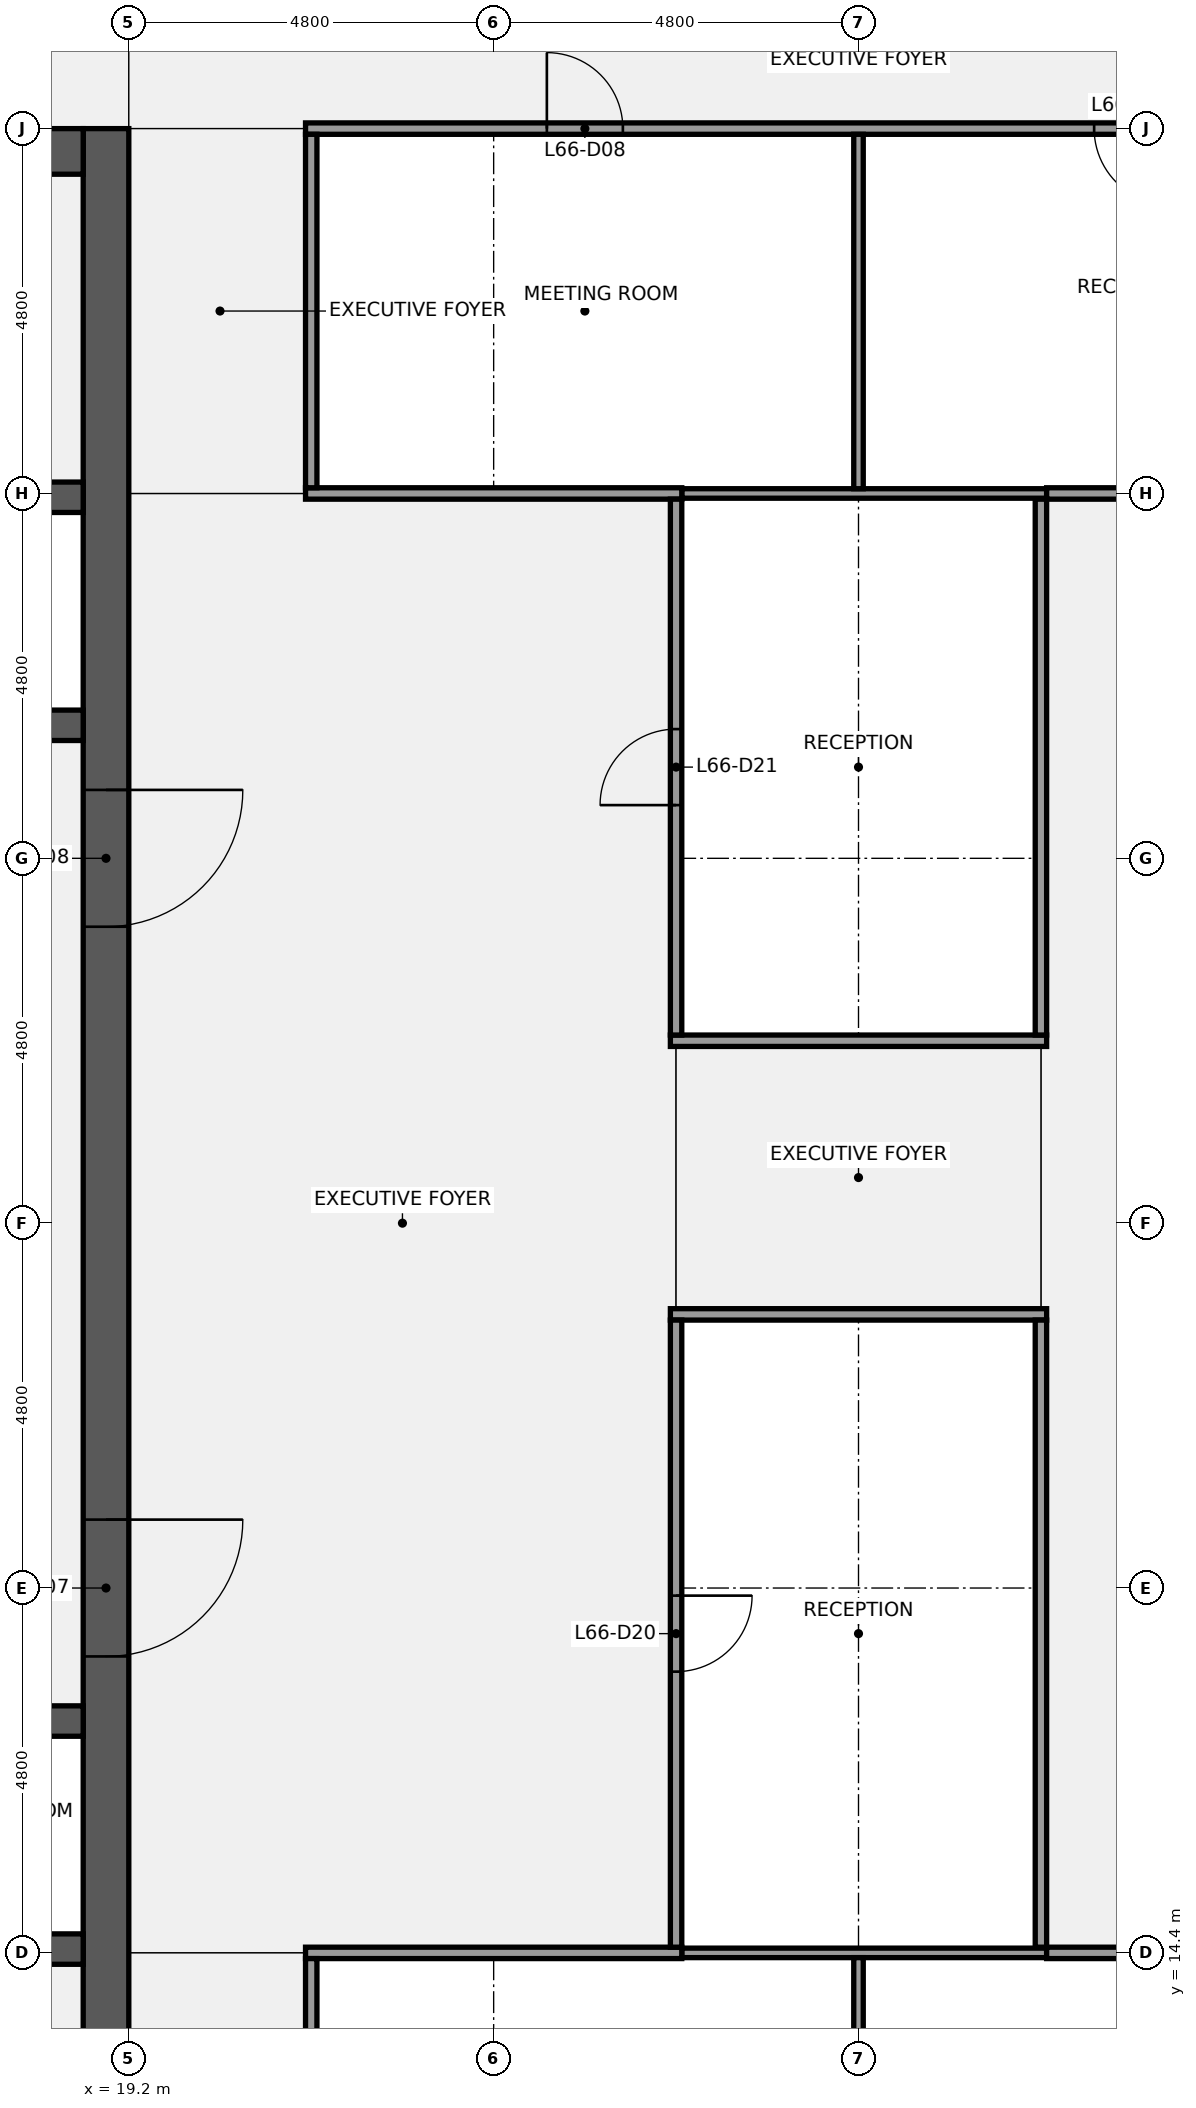
"""IFC4 building model, lengths in metres.
Left out: names, types, materials, properties, quantities, classifications, styles, units other than length and angle.
Written with IfcOpenShell. Run it as: python <this file> out.ifc"""

import sys

from ifc_helpers import new_model, si_unit, direction, frame, frame_2d, origin, place, context, subcontext, project, spatial, rectangle, extrude, element, fill, save


model = new_model("IFC4")
c1 = context("Model", 3, precision=1e-05, world=origin(), true_north=direction((0.0, 1.0)))
c2 = subcontext(c1, "Body", "Model", "MODEL_VIEW")
j1 = project(units=[si_unit("LENGTHUNIT", "METRE"), si_unit("PLANEANGLEUNIT", "RADIAN")], contexts=[c1])
p1 = place(None, origin())
s1 = spatial("IfcSite", under=j1, at=p1, CompositionType="ELEMENT")
p2 = place(p1, origin())
s2 = spatial("IfcBuilding", under=s1, at=p2, CompositionType="ELEMENT")
p3 = place(p2, frame((0.0, 0.0, 302.3)))
s3 = spatial("IfcBuildingStorey", under=s2, at=p3, CompositionType="ELEMENT", Elevation=302.3)
p4 = place(p3, frame((18.9, 38.4, 0.0), z_axis=(0.0, 0.0, 1.0), x_axis=(0.0, -1.0, 0.0)))
e1 = element("IfcWall", 1, at=p4, inside=s3, PredefinedType="SHEAR", context=c2, shape_type="SweptSolid", body=[
    extrude(rectangle(XDim=28.8, YDim=0.6, at=frame_2d((14.4, 0.0))), origin(), (0.0, 0.0, 1.0), 3.84),
])
p5 = place(p4, frame((18.3, 0.0, 0.0)))
e2 = element("IfcOpeningElement", 2, at=p5, cuts=e1, PredefinedType="OPENING", context=c2, shape_type="SweptSolid", body=[
    extrude(rectangle(XDim=1.8, YDim=2.1, at=frame_2d((0.9, 1.05))), frame((0.0, 0.31, 0.0), z_axis=(0.0, -1.0, 0.0), x_axis=(1.0, 0.0, 0.0)), (0.0, 0.0, 1.0), 0.62),
])
p6 = place(p4, frame((8.7, 0.0, 0.0)))
e3 = element("IfcOpeningElement", 3, at=p6, cuts=e1, PredefinedType="OPENING", context=c2, shape_type="SweptSolid", body=[
    extrude(rectangle(XDim=1.8, YDim=2.1, at=frame_2d((0.9, 1.05))), frame((0.0, 0.31, 0.0), z_axis=(0.0, -1.0, 0.0), x_axis=(1.0, 0.0, 0.0)), (0.0, 0.0, 1.0), 0.62),
])
p7 = place(p3, frame((0.6, 14.45, 0.0), z_axis=(0.0, 0.0, 1.0), x_axis=(1.0, 0.0, 0.0)))
e4 = element("IfcWall", 4, at=p7, inside=s3, PredefinedType="SHEAR", context=c2, shape_type="SweptSolid", body=[
    extrude(rectangle(XDim=18.0, YDim=0.4, at=frame_2d((9.0, 0.0))), origin(), (0.0, 0.0, 1.0), 3.84),
])
p8 = place(p3, frame((0.6, 17.45, 0.0), z_axis=(0.0, 0.0, 1.0), x_axis=(1.0, 0.0, 0.0)))
e5 = element("IfcWall", 5, at=p8, inside=s3, PredefinedType="SHEAR", context=c2, shape_type="SweptSolid", body=[
    extrude(rectangle(XDim=18.0, YDim=0.4, at=frame_2d((9.0, 0.0))), origin(), (0.0, 0.0, 1.0), 3.84),
])
p9 = place(p8, frame((2.163, 0.0, 0.0)))
e6 = element("IfcOpeningElement", 6, at=p9, cuts=e5, PredefinedType="OPENING", context=c2, shape_type="SweptSolid", body=[
    extrude(rectangle(XDim=1.0, YDim=2.1, at=frame_2d((0.5, 1.05))), frame((0.0, 0.21, 0.0), z_axis=(0.0, -1.0, 0.0), x_axis=(1.0, 0.0, 0.0)), (0.0, 0.0, 1.0), 0.42),
])
p10 = place(p8, frame((7.0, 0.0, 0.0)))
e7 = element("IfcOpeningElement", 7, at=p10, cuts=e5, PredefinedType="OPENING", context=c2, shape_type="SweptSolid", body=[
    extrude(rectangle(XDim=1.0, YDim=2.1, at=frame_2d((0.5, 1.05))), frame((0.0, 0.21, 0.0), z_axis=(0.0, -1.0, 0.0), x_axis=(1.0, 0.0, 0.0)), (0.0, 0.0, 1.0), 0.42),
])
p11 = place(p8, frame((11.5, 0.0, 0.0)))
e8 = element("IfcOpeningElement", 8, at=p11, cuts=e5, PredefinedType="OPENING", context=c2, shape_type="SweptSolid", body=[
    extrude(rectangle(XDim=1.0, YDim=2.1, at=frame_2d((0.5, 1.05))), frame((0.0, 0.21, 0.0), z_axis=(0.0, -1.0, 0.0), x_axis=(1.0, 0.0, 0.0)), (0.0, 0.0, 1.0), 0.42),
])
p12 = place(p8, frame((15.738, 0.0, 0.0)))
e9 = element("IfcOpeningElement", 9, at=p12, cuts=e5, PredefinedType="OPENING", context=c2, shape_type="SweptSolid", body=[
    extrude(rectangle(XDim=1.0, YDim=2.1, at=frame_2d((0.5, 1.05))), frame((0.0, 0.21, 0.0), z_axis=(0.0, -1.0, 0.0), x_axis=(1.0, 0.0, 0.0)), (0.0, 0.0, 1.0), 0.42),
])
p13 = place(p3, frame((0.6, 30.55, 0.0), z_axis=(0.0, 0.0, 1.0), x_axis=(1.0, 0.0, 0.0)))
e10 = element("IfcWall", 10, at=p13, inside=s3, PredefinedType="SHEAR", context=c2, shape_type="SweptSolid", body=[
    extrude(rectangle(XDim=18.0, YDim=0.4, at=frame_2d((9.0, 0.0))), origin(), (0.0, 0.0, 1.0), 3.84),
])
p14 = place(p13, frame((1.6, 0.0, 0.0)))
e11 = element("IfcOpeningElement", 11, at=p14, cuts=e10, PredefinedType="OPENING", context=c2, shape_type="SweptSolid", body=[
    extrude(rectangle(XDim=1.2, YDim=2.1, at=frame_2d((0.6, 1.05))), frame((0.0, 0.21, 0.0), z_axis=(0.0, -1.0, 0.0), x_axis=(1.0, 0.0, 0.0)), (0.0, 0.0, 1.0), 0.42),
])
p15 = place(p13, frame((4.2, 0.0, 0.0)))
e12 = element("IfcOpeningElement", 12, at=p15, cuts=e10, PredefinedType="OPENING", context=c2, shape_type="SweptSolid", body=[
    extrude(rectangle(XDim=1.2, YDim=2.1, at=frame_2d((0.6, 1.05))), frame((0.0, 0.21, 0.0), z_axis=(0.0, -1.0, 0.0), x_axis=(1.0, 0.0, 0.0)), (0.0, 0.0, 1.0), 0.42),
])
p16 = place(p13, frame((6.8, 0.0, 0.0)))
e13 = element("IfcOpeningElement", 13, at=p16, cuts=e10, PredefinedType="OPENING", context=c2, shape_type="SweptSolid", body=[
    extrude(rectangle(XDim=1.2, YDim=2.1, at=frame_2d((0.6, 1.05))), frame((0.0, 0.21, 0.0), z_axis=(0.0, -1.0, 0.0), x_axis=(1.0, 0.0, 0.0)), (0.0, 0.0, 1.0), 0.42),
])
p17 = place(p13, frame((10.0, 0.0, 0.0)))
e14 = element("IfcOpeningElement", 14, at=p17, cuts=e10, PredefinedType="OPENING", context=c2, shape_type="SweptSolid", body=[
    extrude(rectangle(XDim=1.2, YDim=2.1, at=frame_2d((0.6, 1.05))), frame((0.0, 0.21, 0.0), z_axis=(0.0, -1.0, 0.0), x_axis=(1.0, 0.0, 0.0)), (0.0, 0.0, 1.0), 0.42),
])
p18 = place(p13, frame((12.6, 0.0, 0.0)))
e15 = element("IfcOpeningElement", 15, at=p18, cuts=e10, PredefinedType="OPENING", context=c2, shape_type="SweptSolid", body=[
    extrude(rectangle(XDim=1.2, YDim=2.1, at=frame_2d((0.6, 1.05))), frame((0.0, 0.21, 0.0), z_axis=(0.0, -1.0, 0.0), x_axis=(1.0, 0.0, 0.0)), (0.0, 0.0, 1.0), 0.42),
])
p19 = place(p13, frame((15.2, 0.0, 0.0)))
e16 = element("IfcOpeningElement", 16, at=p19, cuts=e10, PredefinedType="OPENING", context=c2, shape_type="SweptSolid", body=[
    extrude(rectangle(XDim=1.2, YDim=2.1, at=frame_2d((0.6, 1.05))), frame((0.0, 0.21, 0.0), z_axis=(0.0, -1.0, 0.0), x_axis=(1.0, 0.0, 0.0)), (0.0, 0.0, 1.0), 0.42),
])
p20 = place(p3, frame((0.6, 33.55, 0.0), z_axis=(0.0, 0.0, 1.0), x_axis=(1.0, 0.0, 0.0)))
e17 = element("IfcWall", 17, at=p20, inside=s3, PredefinedType="SHEAR", context=c2, shape_type="SweptSolid", body=[
    extrude(rectangle(XDim=18.0, YDim=0.4, at=frame_2d((9.0, 0.0))), origin(), (0.0, 0.0, 1.0), 3.84),
])
p21 = place(p3, frame((14.4, 38.1, 0.0), z_axis=(0.0, 0.0, 1.0), x_axis=(1.0, 0.0, 0.0)))
e18 = element("IfcWall", 18, at=p21, inside=s3, PredefinedType="SHEAR", context=c2, shape_type="SweptSolid", body=[
    extrude(rectangle(XDim=4.2, YDim=0.6, at=frame_2d((2.1, 0.0))), origin(), (0.0, 0.0, 1.0), 3.84),
])
p22 = place(p21, frame((1.85, 0.0, 0.0)))
e19 = element("IfcOpeningElement", 19, at=p22, cuts=e18, PredefinedType="OPENING", context=c2, shape_type="SweptSolid", body=[
    extrude(rectangle(XDim=1.1, YDim=2.1, at=frame_2d((0.55, 1.05))), frame((0.0, 0.31, 0.0), z_axis=(0.0, -1.0, 0.0), x_axis=(1.0, 0.0, 0.0)), (0.0, 0.0, 1.0), 0.62),
])
p23 = place(p3, frame((26.475, 14.4, 0.0), z_axis=(0.0, 0.0, 1.0), x_axis=(1.0, 0.0, 0.0)))
e20 = element("IfcWall", 20, at=p23, inside=s3, PredefinedType="PARTITIONING", context=c2, shape_type="SweptSolid", body=[
    extrude(rectangle(XDim=4.8, YDim=0.125, at=frame_2d((2.4, 0.0))), origin(), (0.0, 0.0, 1.0), 2.87),
])
p24 = place(p3, frame((21.525, 14.4, 0.0), z_axis=(0.0, 0.0, 1.0), x_axis=(1.0, 0.0, 0.0)))
e21 = element("IfcWall", 21, at=p24, inside=s3, PredefinedType="PARTITIONING", context=c2, shape_type="SweptSolid", body=[
    extrude(rectangle(XDim=4.95, YDim=0.15, at=frame_2d((2.475, 0.0))), origin(), (0.0, 0.0, 1.0), 2.87),
])
p25 = place(p3, frame((31.275, 14.4, 0.0), z_axis=(0.0, 0.0, 1.0), x_axis=(1.0, 0.0, 0.0)))
e22 = element("IfcWall", 22, at=p25, inside=s3, PredefinedType="PARTITIONING", context=c2, shape_type="SweptSolid", body=[
    extrude(rectangle(XDim=4.8, YDim=0.15, at=frame_2d((2.4, 0.0))), origin(), (0.0, 0.0, 1.0), 2.87),
])
for number, where, z_axis, x_axis in (
    (23, (26.325, 22.8, 0.0), (0.0, 0.0, 1.0), (1.0, 0.0, 0.0)),
    (24, (26.325, 26.4, 0.0), (0.0, 0.0, 1.0), (1.0, 0.0, 0.0)),
):
    element("IfcWall", number, at=place(p3, frame(where, z_axis=z_axis, x_axis=x_axis)), inside=s3, PredefinedType="PARTITIONING", context=c2, shape_type="SweptSolid", body=[
        extrude(rectangle(XDim=4.95, YDim=0.15, at=frame_2d((2.475, 0.0))), origin(), (0.0, 0.0, 1.0), 2.87),
    ])
p26 = place(p3, frame((26.475, 33.6, 0.0), z_axis=(0.0, 0.0, 1.0), x_axis=(1.0, 0.0, 0.0)))
e25 = element("IfcWall", 25, at=p26, inside=s3, PredefinedType="PARTITIONING", context=c2, shape_type="SweptSolid", body=[
    extrude(rectangle(XDim=4.8, YDim=0.125, at=frame_2d((2.4, 0.0))), origin(), (0.0, 0.0, 1.0), 2.87),
])
p27 = place(p3, frame((21.525, 33.6, 0.0), z_axis=(0.0, 0.0, 1.0), x_axis=(1.0, 0.0, 0.0)))
e26 = element("IfcWall", 26, at=p27, inside=s3, PredefinedType="PARTITIONING", context=c2, shape_type="SweptSolid", body=[
    extrude(rectangle(XDim=4.95, YDim=0.15, at=frame_2d((2.475, 0.0))), origin(), (0.0, 0.0, 1.0), 2.87),
])
p28 = place(p3, frame((31.275, 33.6, 0.0), z_axis=(0.0, 0.0, 1.0), x_axis=(1.0, 0.0, 0.0)))
e27 = element("IfcWall", 27, at=p28, inside=s3, PredefinedType="PARTITIONING", context=c2, shape_type="SweptSolid", body=[
    extrude(rectangle(XDim=4.8, YDim=0.15, at=frame_2d((2.4, 0.0))), origin(), (0.0, 0.0, 1.0), 2.87),
])
p29 = place(p3, frame((21.525, 38.4, 0.0), z_axis=(0.0, 0.0, 1.0), x_axis=(1.0, 0.0, 0.0)))
e28 = element("IfcWall", 28, at=p29, inside=s3, PredefinedType="PARTITIONING", context=c2, shape_type="SweptSolid", body=[
    extrude(rectangle(XDim=14.55, YDim=0.15, at=frame_2d((7.275, 0.0))), origin(), (0.0, 0.0, 1.0), 2.87),
])
p30 = place(p29, frame((3.175, 0.0, 0.0)))
e29 = element("IfcOpeningElement", 29, at=p30, cuts=e28, PredefinedType="OPENING", context=c2, shape_type="SweptSolid", body=[
    extrude(rectangle(XDim=1.0, YDim=2.1, at=frame_2d((0.5, 1.05))), frame((0.0, 0.085, 0.0), z_axis=(0.0, -1.0, 0.0), x_axis=(1.0, 0.0, 0.0)), (0.0, 0.0, 1.0), 0.17),
])
p31 = place(p29, frame((10.375, 0.0, 0.0)))
e30 = element("IfcOpeningElement", 30, at=p31, cuts=e28, PredefinedType="OPENING", context=c2, shape_type="SweptSolid", body=[
    extrude(rectangle(XDim=1.0, YDim=2.1, at=frame_2d((0.5, 1.05))), frame((0.0, 0.085, 0.0), z_axis=(0.0, -1.0, 0.0), x_axis=(1.0, 0.0, 0.0)), (0.0, 0.0, 1.0), 0.17),
])
for number, where, z_axis, x_axis in (
    (31, (21.6, 9.675, 0.0), (0.0, 0.0, 1.0), (0.0, 1.0, 0.0)),
    (32, (21.6, 33.675, 0.0), (0.0, 0.0, 1.0), (0.0, 1.0, 0.0)),
):
    element("IfcWall", number, at=place(p3, frame(where, z_axis=z_axis, x_axis=x_axis)), inside=s3, PredefinedType="PARTITIONING", context=c2, shape_type="SweptSolid", body=[
        extrude(rectangle(XDim=4.65, YDim=0.15, at=frame_2d((2.325, 0.0))), origin(), (0.0, 0.0, 1.0), 2.87),
    ])
p32 = place(p3, frame((26.4, 14.475, 0.0), z_axis=(0.0, 0.0, 1.0), x_axis=(0.0, 1.0, 0.0)))
e33 = element("IfcWall", 33, at=p32, inside=s3, PredefinedType="PARTITIONING", context=c2, shape_type="SweptSolid", body=[
    extrude(rectangle(XDim=8.25, YDim=0.15, at=frame_2d((4.125, 0.0))), origin(), (0.0, 0.0, 1.0), 2.87),
])
p33 = place(p32, frame((3.625, 0.0, 0.0)))
e34 = element("IfcOpeningElement", 34, at=p33, cuts=e33, PredefinedType="OPENING", context=c2, shape_type="SweptSolid", body=[
    extrude(rectangle(XDim=1.0, YDim=2.1, at=frame_2d((0.5, 1.05))), frame((0.0, 0.085, 0.0), z_axis=(0.0, -1.0, 0.0), x_axis=(1.0, 0.0, 0.0)), (0.0, 0.0, 1.0), 0.17),
])
p34 = place(p3, frame((26.4, 26.475, 0.0), z_axis=(0.0, 0.0, 1.0), x_axis=(0.0, 1.0, 0.0)))
e35 = element("IfcWall", 35, at=p34, inside=s3, PredefinedType="PARTITIONING", context=c2, shape_type="SweptSolid", body=[
    extrude(rectangle(XDim=7.05, YDim=0.15, at=frame_2d((3.525, 0.0))), origin(), (0.0, 0.0, 1.0), 2.87),
])
p35 = place(p34, frame((3.025, 0.0, 0.0)))
e36 = element("IfcOpeningElement", 36, at=p35, cuts=e35, PredefinedType="OPENING", context=c2, shape_type="SweptSolid", body=[
    extrude(rectangle(XDim=1.0, YDim=2.1, at=frame_2d((0.5, 1.05))), frame((0.0, 0.085, 0.0), z_axis=(0.0, -1.0, 0.0), x_axis=(1.0, 0.0, 0.0)), (0.0, 0.0, 1.0), 0.17),
])
for number, where, z_axis, x_axis in (
    (37, (28.8, 9.675, 0.0), (0.0, 0.0, 1.0), (0.0, 1.0, 0.0)),
    (38, (28.8, 33.663, 0.0), (0.0, 0.0, 1.0), (0.0, 1.0, 0.0)),
):
    element("IfcWall", number, at=place(p3, frame(where, z_axis=z_axis, x_axis=x_axis)), inside=s3, PredefinedType="PARTITIONING", context=c2, shape_type="SweptSolid", body=[
        extrude(rectangle(XDim=4.662, YDim=0.125, at=frame_2d((2.331, 0.0))), origin(), (0.0, 0.0, 1.0), 2.87),
    ])
p36 = place(p3, frame((31.2, 14.475, 0.0), z_axis=(0.0, 0.0, 1.0), x_axis=(0.0, 1.0, 0.0)))
e39 = element("IfcWall", 39, at=p36, inside=s3, PredefinedType="PARTITIONING", context=c2, shape_type="SweptSolid", body=[
    extrude(rectangle(XDim=8.25, YDim=0.15, at=frame_2d((4.125, 0.0))), origin(), (0.0, 0.0, 1.0), 2.87),
])
p37 = place(p3, frame((31.2, 26.475, 0.0), z_axis=(0.0, 0.0, 1.0), x_axis=(0.0, 1.0, 0.0)))
e40 = element("IfcWall", 40, at=p37, inside=s3, PredefinedType="PARTITIONING", context=c2, shape_type="SweptSolid", body=[
    extrude(rectangle(XDim=7.05, YDim=0.15, at=frame_2d((3.525, 0.0))), origin(), (0.0, 0.0, 1.0), 2.87),
])
p38 = place(p5, origin())
e41 = element("IfcDoor", 41, at=p38, inside=s3, OperationType="DOUBLE_DOOR_SINGLE_SWING", PredefinedType="DOOR", context=c2, shape_type="SweptSolid", body=[
    extrude(rectangle(XDim=1.8, YDim=2.1, at=frame_2d((0.9, 1.05))), frame((0.0, 0.025, 0.0), z_axis=(0.0, -1.0, 0.0), x_axis=(1.0, 0.0, 0.0)), (0.0, 0.0, 1.0), 0.05),
])
fill(e2, e41)
p39 = place(p6, origin())
e42 = element("IfcDoor", 42, at=p39, inside=s3, OperationType="DOUBLE_DOOR_SINGLE_SWING", PredefinedType="DOOR", context=c2, shape_type="SweptSolid", body=[
    extrude(rectangle(XDim=1.8, YDim=2.1, at=frame_2d((0.9, 1.05))), frame((0.0, 0.025, 0.0), z_axis=(0.0, -1.0, 0.0), x_axis=(1.0, 0.0, 0.0)), (0.0, 0.0, 1.0), 0.05),
])
fill(e3, e42)
p40 = place(p30, origin())
e43 = element("IfcDoor", 43, at=p40, inside=s3, OperationType="SINGLE_SWING_LEFT", PredefinedType="DOOR", context=c2, shape_type="SweptSolid", body=[
    extrude(rectangle(XDim=1.0, YDim=2.1, at=frame_2d((0.5, 1.05))), frame((0.0, 0.025, 0.0), z_axis=(0.0, -1.0, 0.0), x_axis=(1.0, 0.0, 0.0)), (0.0, 0.0, 1.0), 0.05),
])
fill(e29, e43)
p41 = place(p31, origin())
e44 = element("IfcDoor", 44, at=p41, inside=s3, OperationType="SINGLE_SWING_RIGHT", PredefinedType="DOOR", context=c2, shape_type="SweptSolid", body=[
    extrude(rectangle(XDim=1.0, YDim=2.1, at=frame_2d((0.5, 1.05))), frame((0.0, 0.025, 0.0), z_axis=(0.0, -1.0, 0.0), x_axis=(1.0, 0.0, 0.0)), (0.0, 0.0, 1.0), 0.05),
])
fill(e30, e44)
p42 = place(p33, origin())
e45 = element("IfcDoor", 45, at=p42, inside=s3, OperationType="SINGLE_SWING_RIGHT", PredefinedType="DOOR", context=c2, shape_type="SweptSolid", body=[
    extrude(rectangle(XDim=1.0, YDim=2.1, at=frame_2d((0.5, 1.05))), frame((0.0, 0.025, 0.0), z_axis=(0.0, -1.0, 0.0), x_axis=(1.0, 0.0, 0.0)), (0.0, 0.0, 1.0), 0.05),
])
fill(e34, e45)
p43 = place(p35, origin())
e46 = element("IfcDoor", 46, at=p43, inside=s3, OperationType="SINGLE_SWING_LEFT", PredefinedType="DOOR", context=c2, shape_type="SweptSolid", body=[
    extrude(rectangle(XDim=1.0, YDim=2.1, at=frame_2d((0.5, 1.05))), frame((0.0, 0.025, 0.0), z_axis=(0.0, -1.0, 0.0), x_axis=(1.0, 0.0, 0.0)), (0.0, 0.0, 1.0), 0.05),
])
fill(e36, e46)
save(model, sys.argv[1])
